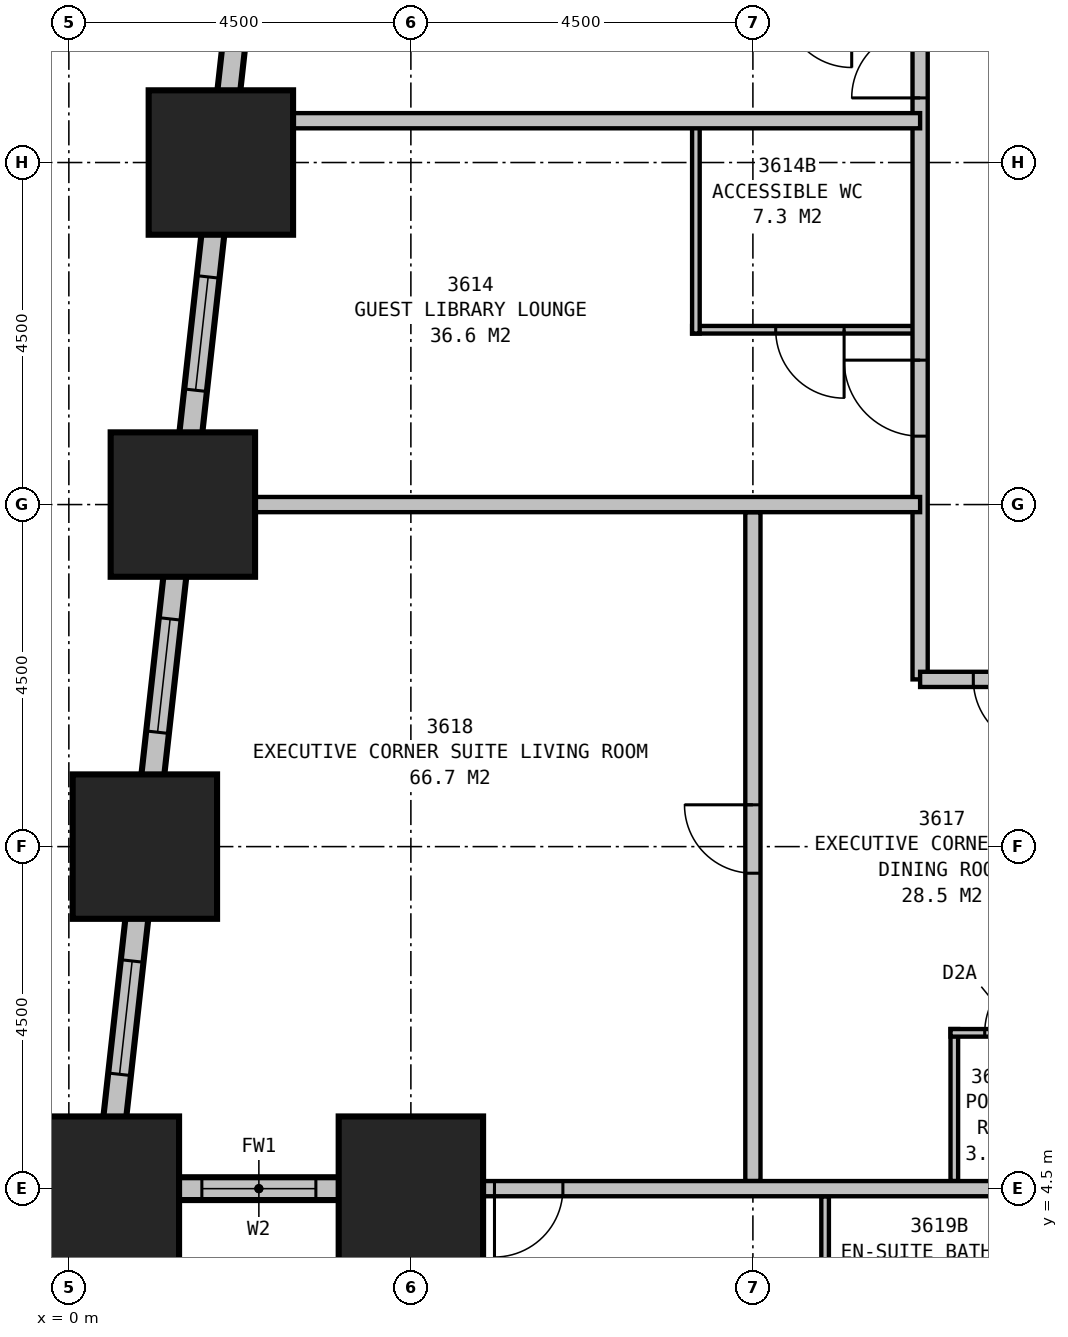
"""IFC4 building model, lengths in metres.
Left out: names, types, materials, properties, quantities, classifications, styles, units other than length and angle.
Written with IfcOpenShell. Run it as: python <this file> out.ifc"""

import sys

from ifc_helpers import new_model, si_unit, direction, frame, frame_2d, origin, origin_2d, place, context, subcontext, project, spatial, rectangle, extrude, element, fill, save


model = new_model("IFC4")
c1 = context("Model", 3, precision=1e-05, world=origin(), true_north=direction((0.0, 1.0)))
c2 = subcontext(c1, "Body", "Model", "MODEL_VIEW")
j1 = project(units=[si_unit("LENGTHUNIT", "METRE"), si_unit("PLANEANGLEUNIT", "RADIAN")], contexts=[c1])
p1 = place(None, origin())
s1 = spatial("IfcSite", under=j1, at=p1, CompositionType="ELEMENT")
p2 = place(p1, origin())
s2 = spatial("IfcBuilding", under=s1, at=p2, CompositionType="ELEMENT")
p3 = place(p2, frame((0.0, 0.0, 138.9)))
s3 = spatial("IfcBuildingStorey", under=s2, at=p3, CompositionType="ELEMENT", Elevation=138.9)
for number, where, z_axis, x_axis in (
    (1, (0.5, 4.5, 0.0), (0.0, 0.0, 1.0), (1.0, 0.0, 0.0)),
    (2, (4.5, 4.5, 0.0), (0.0, 0.0, 1.0), (1.0, 0.0, 0.0)),
    (3, (2.0, 18.0, 0.0), (0.0, 0.0, 1.0), (1.0, 0.0, 0.0)),
    (4, (1.5, 13.5, 0.0), (0.0, 0.0, 1.0), (1.0, 0.0, 0.0)),
    (5, (1.0, 9.0, 0.0), (0.0, 0.0, 1.0), (1.0, 0.0, 0.0)),
):
    element("IfcColumn", number, at=place(p3, frame(where, z_axis=z_axis, x_axis=x_axis)), inside=s3, PredefinedType="COLUMN", context=c2, shape_type="SweptSolid", body=[
        extrude(rectangle(XDim=1.9, YDim=1.9, at=origin_2d()), origin(), (0.0, 0.0, 1.0), 3.5),
    ])
p4 = place(p3, frame((0.35, 4.5, 0.0), z_axis=(0.0, 0.0, 1.0), x_axis=(1.0, 0.0, 0.0)))
e6 = element("IfcWall", 6, at=p4, inside=s3, PredefinedType="STANDARD", context=c2, shape_type="SweptSolid", body=[
    extrude(rectangle(XDim=4.3, YDim=0.3, at=frame_2d((2.15, 0.0))), origin(), (0.0, 0.0, 1.0), 2.15),
])
p5 = place(p4, frame((1.4, 0.0, 0.5)))
e7 = element("IfcOpeningElement", 7, at=p5, cuts=e6, PredefinedType="OPENING", context=c2, shape_type="SweptSolid", body=[
    extrude(rectangle(XDim=1.5, YDim=1.5, at=frame_2d((0.75, 0.75))), frame((0.0, 0.16, 0.0), z_axis=(0.0, -1.0, 0.0), x_axis=(1.0, 0.0, 0.0)), (0.0, 0.0, 1.0), 0.32),
])
p6 = place(p3, frame((4.5, 4.65, 0.0), z_axis=(0.0, 0.0, 1.0), x_axis=(0.0, -1.0, 0.0)))
e8 = element("IfcWall", 8, at=p6, inside=s3, PredefinedType="STANDARD", context=c2, shape_type="SweptSolid", body=[
    extrude(rectangle(XDim=4.8, YDim=0.3, at=frame_2d((2.4, 0.0))), origin(), (0.0, 0.0, 1.0), 2.15),
])
p7 = place(p6, frame((1.65, 0.0, 0.5)))
e9 = element("IfcOpeningElement", 9, at=p7, cuts=e8, PredefinedType="OPENING", context=c2, shape_type="SweptSolid", body=[
    extrude(rectangle(XDim=1.5, YDim=1.5, at=frame_2d((0.75, 0.75))), frame((0.0, 0.16, 0.0), z_axis=(0.0, -1.0, 0.0), x_axis=(1.0, 0.0, 0.0)), (0.0, 0.0, 1.0), 0.32),
])
p8 = place(p3, frame((4.017, 36.149, 0.0), z_axis=(0.0, 0.0, 1.0), x_axis=(-0.110433201132, -0.993883548555, 0.0)))
e10 = element("IfcWall", 10, at=p8, inside=s3, PredefinedType="STANDARD", context=c2, shape_type="SweptSolid", body=[
    extrude(rectangle(XDim=31.994, YDim=0.3, at=frame_2d((15.997, 0.0))), origin(), (0.0, 0.0, 1.0), 2.15),
])
p9 = place(p8, frame((1.664, 0.0, 0.5)))
e11 = element("IfcOpeningElement", 11, at=p9, cuts=e10, PredefinedType="OPENING", context=c2, shape_type="SweptSolid", body=[
    extrude(rectangle(XDim=1.5, YDim=1.5, at=frame_2d((0.75, 0.75))), frame((0.0, 0.16, 0.0), z_axis=(0.0, -1.0, 0.0), x_axis=(1.0, 0.0, 0.0)), (0.0, 0.0, 1.0), 0.32),
])
p10 = place(p8, frame((6.192, 0.0, 0.5)))
e12 = element("IfcOpeningElement", 12, at=p10, cuts=e10, PredefinedType="OPENING", context=c2, shape_type="SweptSolid", body=[
    extrude(rectangle(XDim=1.5, YDim=1.5, at=frame_2d((0.75, 0.75))), frame((0.0, 0.16, 0.0), z_axis=(0.0, -1.0, 0.0), x_axis=(1.0, 0.0, 0.0)), (0.0, 0.0, 1.0), 0.32),
])
p11 = place(p8, frame((10.719, 0.0, 0.5)))
e13 = element("IfcOpeningElement", 13, at=p11, cuts=e10, PredefinedType="OPENING", context=c2, shape_type="SweptSolid", body=[
    extrude(rectangle(XDim=1.5, YDim=1.5, at=frame_2d((0.75, 0.75))), frame((0.0, 0.16, 0.0), z_axis=(0.0, -1.0, 0.0), x_axis=(1.0, 0.0, 0.0)), (0.0, 0.0, 1.0), 0.32),
])
p12 = place(p8, frame((15.247, 0.0, 0.5)))
e14 = element("IfcOpeningElement", 14, at=p12, cuts=e10, PredefinedType="OPENING", context=c2, shape_type="SweptSolid", body=[
    extrude(rectangle(XDim=1.5, YDim=1.5, at=frame_2d((0.75, 0.75))), frame((0.0, 0.16, 0.0), z_axis=(0.0, -1.0, 0.0), x_axis=(1.0, 0.0, 0.0)), (0.0, 0.0, 1.0), 0.32),
])
p13 = place(p8, frame((19.775, 0.0, 0.5)))
e15 = element("IfcOpeningElement", 15, at=p13, cuts=e10, PredefinedType="OPENING", context=c2, shape_type="SweptSolid", body=[
    extrude(rectangle(XDim=1.5, YDim=1.5, at=frame_2d((0.75, 0.75))), frame((0.0, 0.16, 0.0), z_axis=(0.0, -1.0, 0.0), x_axis=(1.0, 0.0, 0.0)), (0.0, 0.0, 1.0), 0.32),
])
p14 = place(p8, frame((24.302, 0.0, 0.5)))
e16 = element("IfcOpeningElement", 16, at=p14, cuts=e10, PredefinedType="OPENING", context=c2, shape_type="SweptSolid", body=[
    extrude(rectangle(XDim=1.5, YDim=1.5, at=frame_2d((0.75, 0.75))), frame((0.0, 0.16, 0.0), z_axis=(0.0, -1.0, 0.0), x_axis=(1.0, 0.0, 0.0)), (0.0, 0.0, 1.0), 0.32),
])
p15 = place(p8, frame((28.83, 0.0, 0.5)))
e17 = element("IfcOpeningElement", 17, at=p15, cuts=e10, PredefinedType="OPENING", context=c2, shape_type="SweptSolid", body=[
    extrude(rectangle(XDim=1.5, YDim=1.5, at=frame_2d((0.75, 0.75))), frame((0.0, 0.16, 0.0), z_axis=(0.0, -1.0, 0.0), x_axis=(1.0, 0.0, 0.0)), (0.0, 0.0, 1.0), 0.32),
])
p16 = place(p3, frame((11.2, 11.2, 0.0), z_axis=(0.0, 0.0, 1.0), x_axis=(1.0, 0.0, 0.0)))
e18 = element("IfcWall", 18, at=p16, inside=s3, PredefinedType="PARTITIONING", context=c2, shape_type="SweptSolid", body=[
    extrude(rectangle(XDim=27.1, YDim=0.2, at=frame_2d((13.55, 0.0))), origin(), (0.0, 0.0, 1.0), 3.25),
])
p17 = place(p16, frame((4.05, 0.0, 0.0), z_axis=(0.0, 0.0, 1.0), x_axis=(-1.0, 0.0, 0.0)))
e19 = element("IfcOpeningElement", 19, at=p17, cuts=e18, PredefinedType="OPENING", context=c2, shape_type="SweptSolid", body=[
    extrude(rectangle(XDim=0.9, YDim=2.1, at=frame_2d((0.45, 1.05))), frame((0.0, 0.11, 0.0), z_axis=(0.0, -1.0, 0.0), x_axis=(1.0, 0.0, 0.0)), (0.0, 0.0, 1.0), 0.22),
])
p18 = place(p16, frame((12.65, 0.0, 0.0), z_axis=(0.0, 0.0, 1.0), x_axis=(-1.0, 0.0, 0.0)))
e20 = element("IfcOpeningElement", 20, at=p18, cuts=e18, PredefinedType="OPENING", context=c2, shape_type="SweptSolid", body=[
    extrude(rectangle(XDim=1.0, YDim=2.1, at=frame_2d((0.5, 1.05))), frame((0.0, 0.11, 0.0), z_axis=(0.0, -1.0, 0.0), x_axis=(1.0, 0.0, 0.0)), (0.0, 0.0, 1.0), 0.22),
])
p19 = place(p16, frame((19.45, 0.0, 0.0), z_axis=(0.0, 0.0, 1.0), x_axis=(-1.0, 0.0, 0.0)))
e21 = element("IfcOpeningElement", 21, at=p19, cuts=e18, PredefinedType="OPENING", context=c2, shape_type="SweptSolid", body=[
    extrude(rectangle(XDim=0.9, YDim=2.1, at=frame_2d((0.45, 1.05))), frame((0.0, 0.11, 0.0), z_axis=(0.0, -1.0, 0.0), x_axis=(1.0, 0.0, 0.0)), (0.0, 0.0, 1.0), 0.22),
])
p20 = place(p16, frame((1.6, 0.0, 0.0), z_axis=(0.0, 0.0, 1.0), x_axis=(-1.0, 0.0, 0.0)))
e22 = element("IfcOpeningElement", 22, at=p20, cuts=e18, PredefinedType="OPENING", context=c2, shape_type="SweptSolid", body=[
    extrude(rectangle(XDim=0.9, YDim=2.1, at=frame_2d((0.45, 1.05))), frame((0.0, 0.11, 0.0), z_axis=(0.0, -1.0, 0.0), x_axis=(1.0, 0.0, 0.0)), (0.0, 0.0, 1.0), 0.22),
])
p21 = place(p16, frame((26.4, 0.0, 0.0), z_axis=(0.0, 0.0, 1.0), x_axis=(-1.0, 0.0, 0.0)))
e23 = element("IfcOpeningElement", 23, at=p21, cuts=e18, PredefinedType="OPENING", context=c2, shape_type="SweptSolid", body=[
    extrude(rectangle(XDim=0.9, YDim=2.1, at=frame_2d((0.45, 1.05))), frame((0.0, 0.11, 0.0), z_axis=(0.0, -1.0, 0.0), x_axis=(1.0, 0.0, 0.0)), (0.0, 0.0, 1.0), 0.22),
])
p22 = place(p3, frame((11.2, 11.2, 0.0), z_axis=(0.0, 0.0, 1.0), x_axis=(0.0, 1.0, 0.0)))
e24 = element("IfcWall", 24, at=p22, inside=s3, PredefinedType="PARTITIONING", context=c2, shape_type="SweptSolid", body=[
    extrude(rectangle(XDim=18.1, YDim=0.2, at=frame_2d((9.05, 0.0))), origin(), (0.0, 0.0, 1.0), 3.25),
])
p23 = place(p22, frame((3.2, 0.0, 0.0)))
e25 = element("IfcOpeningElement", 25, at=p23, cuts=e24, PredefinedType="OPENING", context=c2, shape_type="SweptSolid", body=[
    extrude(rectangle(XDim=1.0, YDim=2.1, at=frame_2d((0.5, 1.05))), frame((0.0, 0.11, 0.0), z_axis=(0.0, -1.0, 0.0), x_axis=(1.0, 0.0, 0.0)), (0.0, 0.0, 1.0), 0.22),
])
p24 = place(p22, frame((7.65, 0.0, 0.0)))
e26 = element("IfcOpeningElement", 26, at=p24, cuts=e24, PredefinedType="OPENING", context=c2, shape_type="SweptSolid", body=[
    extrude(rectangle(XDim=0.9, YDim=2.1, at=frame_2d((0.45, 1.05))), frame((0.0, 0.11, 0.0), z_axis=(0.0, -1.0, 0.0), x_axis=(1.0, 0.0, 0.0)), (0.0, 0.0, 1.0), 0.22),
])
p25 = place(p3, frame((11.2, 18.55, 0.0), z_axis=(0.0, 0.0, 1.0), x_axis=(-1.0, 0.0, 0.0)))
e27 = element("IfcWall", 27, at=p25, inside=s3, PredefinedType="PARTITIONING", context=c2, shape_type="SweptSolid", body=[
    extrude(rectangle(XDim=9.138, YDim=0.2, at=frame_2d((4.569, 0.0))), origin(), (0.0, 0.0, 1.0), 3.25),
])
p26 = place(p3, frame((8.25, 15.75, 0.0), z_axis=(0.0, 0.0, 1.0), x_axis=(0.0, 1.0, 0.0)))
e28 = element("IfcWall", 28, at=p26, inside=s3, PredefinedType="PLUMBINGWALL", context=c2, shape_type="SweptSolid", body=[
    extrude(rectangle(XDim=2.8, YDim=0.1, at=frame_2d((1.4, 0.0))), origin(), (0.0, 0.0, 1.0), 3.25),
])
p27 = place(p3, frame((11.2, 15.8, 0.0), z_axis=(0.0, 0.0, 1.0), x_axis=(-1.0, 0.0, 0.0)))
e29 = element("IfcWall", 29, at=p27, inside=s3, PredefinedType="PLUMBINGWALL", context=c2, shape_type="SweptSolid", body=[
    extrude(rectangle(XDim=3.0, YDim=0.1, at=frame_2d((1.5, 0.0))), origin(), (0.0, 0.0, 1.0), 3.25),
])
p28 = place(p27, frame((1.0, 0.0, 0.0)))
e30 = element("IfcOpeningElement", 30, at=p28, cuts=e29, PredefinedType="OPENING", context=c2, shape_type="SweptSolid", body=[
    extrude(rectangle(XDim=0.9, YDim=2.1, at=frame_2d((0.45, 1.05))), frame((0.0, 0.06, 0.0), z_axis=(0.0, -1.0, 0.0), x_axis=(1.0, 0.0, 0.0)), (0.0, 0.0, 1.0), 0.12),
])
p29 = place(p3, frame((11.2, 13.5, 0.0), z_axis=(0.0, 0.0, 1.0), x_axis=(-1.0, 0.0, 0.0)))
e31 = element("IfcWall", 31, at=p29, inside=s3, PredefinedType="PARTITIONING", context=c2, shape_type="SweptSolid", body=[
    extrude(rectangle(XDim=9.921, YDim=0.2, at=frame_2d((4.96, 0.0))), origin(), (0.0, 0.0, 1.0), 1.95),
])
p30 = place(p3, frame((13.6, 4.5, 0.0), z_axis=(0.0, 0.0, 1.0), x_axis=(-1.0, 0.0, 0.0)))
e32 = element("IfcWall", 32, at=p30, inside=s3, PredefinedType="PARTITIONING", context=c2, shape_type="SweptSolid", body=[
    extrude(rectangle(XDim=9.1, YDim=0.2, at=frame_2d((4.55, 0.0))), origin(), (0.0, 0.0, 1.0), 3.25),
])
p31 = place(p30, frame((7.1, 0.0, 0.0)))
e33 = element("IfcOpeningElement", 33, at=p31, cuts=e32, PredefinedType="OPENING", context=c2, shape_type="SweptSolid", body=[
    extrude(rectangle(XDim=0.9, YDim=2.1, at=frame_2d((0.45, 1.05))), frame((0.0, 0.11, 0.0), z_axis=(0.0, -1.0, 0.0), x_axis=(1.0, 0.0, 0.0)), (0.0, 0.0, 1.0), 0.22),
])
p32 = place(p3, frame((9.0, 4.6, 0.0), z_axis=(0.0, 0.0, 1.0), x_axis=(0.0, 1.0, 0.0)))
e34 = element("IfcWall", 34, at=p32, inside=s3, PredefinedType="PARTITIONING", context=c2, shape_type="SweptSolid", body=[
    extrude(rectangle(XDim=8.8, YDim=0.2, at=frame_2d((4.4, 0.0))), origin(), (0.0, 0.0, 1.0), 2.25),
])
p33 = place(p32, frame((4.05, 0.0, 0.0)))
e35 = element("IfcOpeningElement", 35, at=p33, cuts=e34, PredefinedType="OPENING", context=c2, shape_type="SweptSolid", body=[
    extrude(rectangle(XDim=0.9, YDim=2.1, at=frame_2d((0.45, 1.05))), frame((0.0, 0.11, 0.0), z_axis=(0.0, -1.0, 0.0), x_axis=(1.0, 0.0, 0.0)), (0.0, 0.0, 1.0), 0.22),
])
p34 = place(p3, frame((11.65, 4.6, 0.0), z_axis=(0.0, 0.0, 1.0), x_axis=(0.0, 1.0, 0.0)))
e36 = element("IfcWall", 36, at=p34, inside=s3, PredefinedType="PLUMBINGWALL", context=c2, shape_type="SweptSolid", body=[
    extrude(rectangle(XDim=2.0, YDim=0.1, at=frame_2d((1.0, 0.0))), origin(), (0.0, 0.0, 1.0), 3.25),
])
p35 = place(p3, frame((13.4, 6.55, 0.0), z_axis=(0.0, 0.0, 1.0), x_axis=(-1.0, 0.0, 0.0)))
e37 = element("IfcWall", 37, at=p35, inside=s3, PredefinedType="PLUMBINGWALL", context=c2, shape_type="SweptSolid", body=[
    extrude(rectangle(XDim=1.8, YDim=0.1, at=frame_2d((0.9, 0.0))), origin(), (0.0, 0.0, 1.0), 3.25),
])
p36 = place(p35, frame((1.35, 0.0, 0.0), z_axis=(0.0, 0.0, 1.0), x_axis=(-1.0, 0.0, 0.0)))
e38 = element("IfcOpeningElement", 38, at=p36, cuts=e37, PredefinedType="OPENING", context=c2, shape_type="SweptSolid", body=[
    extrude(rectangle(XDim=0.9, YDim=2.1, at=frame_2d((0.45, 1.05))), frame((0.0, 0.06, 0.0), z_axis=(0.0, -1.0, 0.0), x_axis=(1.0, 0.0, 0.0)), (0.0, 0.0, 1.0), 0.12),
])
p37 = place(p3, frame((9.95, 4.4, 0.0), z_axis=(0.0, 0.0, 1.0), x_axis=(0.0, -1.0, 0.0)))
e39 = element("IfcWall", 39, at=p37, inside=s3, PredefinedType="PLUMBINGWALL", context=c2, shape_type="SweptSolid", body=[
    extrude(rectangle(XDim=2.3, YDim=0.1, at=frame_2d((1.15, 0.0))), origin(), (0.0, 0.0, 1.0), 3.25),
])
p38 = place(p5, origin())
e40 = element("IfcWindow", 40, at=p38, inside=s3, PartitioningType="SINGLE_PANEL", PredefinedType="WINDOW", context=c2, shape_type="SweptSolid", body=[
    extrude(rectangle(XDim=1.5, YDim=1.5, at=frame_2d((0.75, 0.75))), frame((0.0, 0.03, 0.0), z_axis=(0.0, -1.0, 0.0), x_axis=(1.0, 0.0, 0.0)), (0.0, 0.0, 1.0), 0.06),
])
fill(e7, e40)
p39 = place(p13, origin())
e41 = element("IfcWindow", 41, at=p39, inside=s3, PartitioningType="SINGLE_PANEL", PredefinedType="WINDOW", context=c2, shape_type="SweptSolid", body=[
    extrude(rectangle(XDim=1.5, YDim=1.5, at=frame_2d((0.75, 0.75))), frame((0.0, 0.03, 0.0), z_axis=(0.0, -1.0, 0.0), x_axis=(1.0, 0.0, 0.0)), (0.0, 0.0, 1.0), 0.06),
])
fill(e15, e41)
p40 = place(p14, origin())
e42 = element("IfcWindow", 42, at=p40, inside=s3, PartitioningType="SINGLE_PANEL", PredefinedType="WINDOW", context=c2, shape_type="SweptSolid", body=[
    extrude(rectangle(XDim=1.5, YDim=1.5, at=frame_2d((0.75, 0.75))), frame((0.0, 0.03, 0.0), z_axis=(0.0, -1.0, 0.0), x_axis=(1.0, 0.0, 0.0)), (0.0, 0.0, 1.0), 0.06),
])
fill(e16, e42)
p41 = place(p15, origin())
e43 = element("IfcWindow", 43, at=p41, inside=s3, PartitioningType="SINGLE_PANEL", PredefinedType="WINDOW", context=c2, shape_type="SweptSolid", body=[
    extrude(rectangle(XDim=1.5, YDim=1.5, at=frame_2d((0.75, 0.75))), frame((0.0, 0.03, 0.0), z_axis=(0.0, -1.0, 0.0), x_axis=(1.0, 0.0, 0.0)), (0.0, 0.0, 1.0), 0.06),
])
fill(e17, e43)
p42 = place(p20, origin())
e44 = element("IfcDoor", 44, at=p42, inside=s3, OperationType="SINGLE_SWING_LEFT", PredefinedType="DOOR", context=c2, shape_type="SweptSolid", body=[
    extrude(rectangle(XDim=0.9, YDim=2.1, at=frame_2d((0.45, 1.05))), frame((0.0, 0.025, 0.0), z_axis=(0.0, -1.0, 0.0), x_axis=(1.0, 0.0, 0.0)), (0.0, 0.0, 1.0), 0.05),
])
fill(e22, e44)
p43 = place(p23, origin())
e45 = element("IfcDoor", 45, at=p43, inside=s3, OperationType="SINGLE_SWING_RIGHT", PredefinedType="DOOR", context=c2, shape_type="SweptSolid", body=[
    extrude(rectangle(XDim=1.0, YDim=2.1, at=frame_2d((0.5, 1.05))), frame((0.0, 0.025, 0.0), z_axis=(0.0, -1.0, 0.0), x_axis=(1.0, 0.0, 0.0)), (0.0, 0.0, 1.0), 0.05),
])
fill(e25, e45)
p44 = place(p24, origin())
e46 = element("IfcDoor", 46, at=p44, inside=s3, OperationType="SINGLE_SWING_LEFT", PredefinedType="DOOR", context=c2, shape_type="SweptSolid", body=[
    extrude(rectangle(XDim=0.9, YDim=2.1, at=frame_2d((0.45, 1.05))), frame((0.0, 0.025, 0.0), z_axis=(0.0, -1.0, 0.0), x_axis=(1.0, 0.0, 0.0)), (0.0, 0.0, 1.0), 0.05),
])
fill(e26, e46)
p45 = place(p28, origin())
e47 = element("IfcDoor", 47, at=p45, inside=s3, OperationType="SINGLE_SWING_LEFT", PredefinedType="DOOR", context=c2, shape_type="SweptSolid", body=[
    extrude(rectangle(XDim=0.9, YDim=2.1, at=frame_2d((0.45, 1.05))), frame((0.0, 0.025, 0.0), z_axis=(0.0, -1.0, 0.0), x_axis=(1.0, 0.0, 0.0)), (0.0, 0.0, 1.0), 0.05),
])
fill(e30, e47)
p46 = place(p31, origin())
e48 = element("IfcDoor", 48, at=p46, inside=s3, OperationType="SINGLE_SWING_RIGHT", PredefinedType="DOOR", context=c2, shape_type="SweptSolid", body=[
    extrude(rectangle(XDim=0.9, YDim=2.1, at=frame_2d((0.45, 1.05))), frame((0.0, 0.025, 0.0), z_axis=(0.0, -1.0, 0.0), x_axis=(1.0, 0.0, 0.0)), (0.0, 0.0, 1.0), 0.05),
])
fill(e33, e48)
p47 = place(p33, origin())
e49 = element("IfcDoor", 49, at=p47, inside=s3, OperationType="SINGLE_SWING_RIGHT", PredefinedType="DOOR", context=c2, shape_type="SweptSolid", body=[
    extrude(rectangle(XDim=0.9, YDim=2.1, at=frame_2d((0.45, 1.05))), frame((0.0, 0.025, 0.0), z_axis=(0.0, -1.0, 0.0), x_axis=(1.0, 0.0, 0.0)), (0.0, 0.0, 1.0), 0.05),
])
fill(e35, e49)
p48 = place(p36, origin())
e50 = element("IfcDoor", 50, at=p48, inside=s3, OperationType="SINGLE_SWING_RIGHT", PredefinedType="DOOR", context=c2, shape_type="SweptSolid", body=[
    extrude(rectangle(XDim=0.9, YDim=2.1, at=frame_2d((0.45, 1.05))), frame((0.0, 0.025, 0.0), z_axis=(0.0, -1.0, 0.0), x_axis=(1.0, 0.0, 0.0)), (0.0, 0.0, 1.0), 0.05),
])
fill(e38, e50)
save(model, sys.argv[1])
